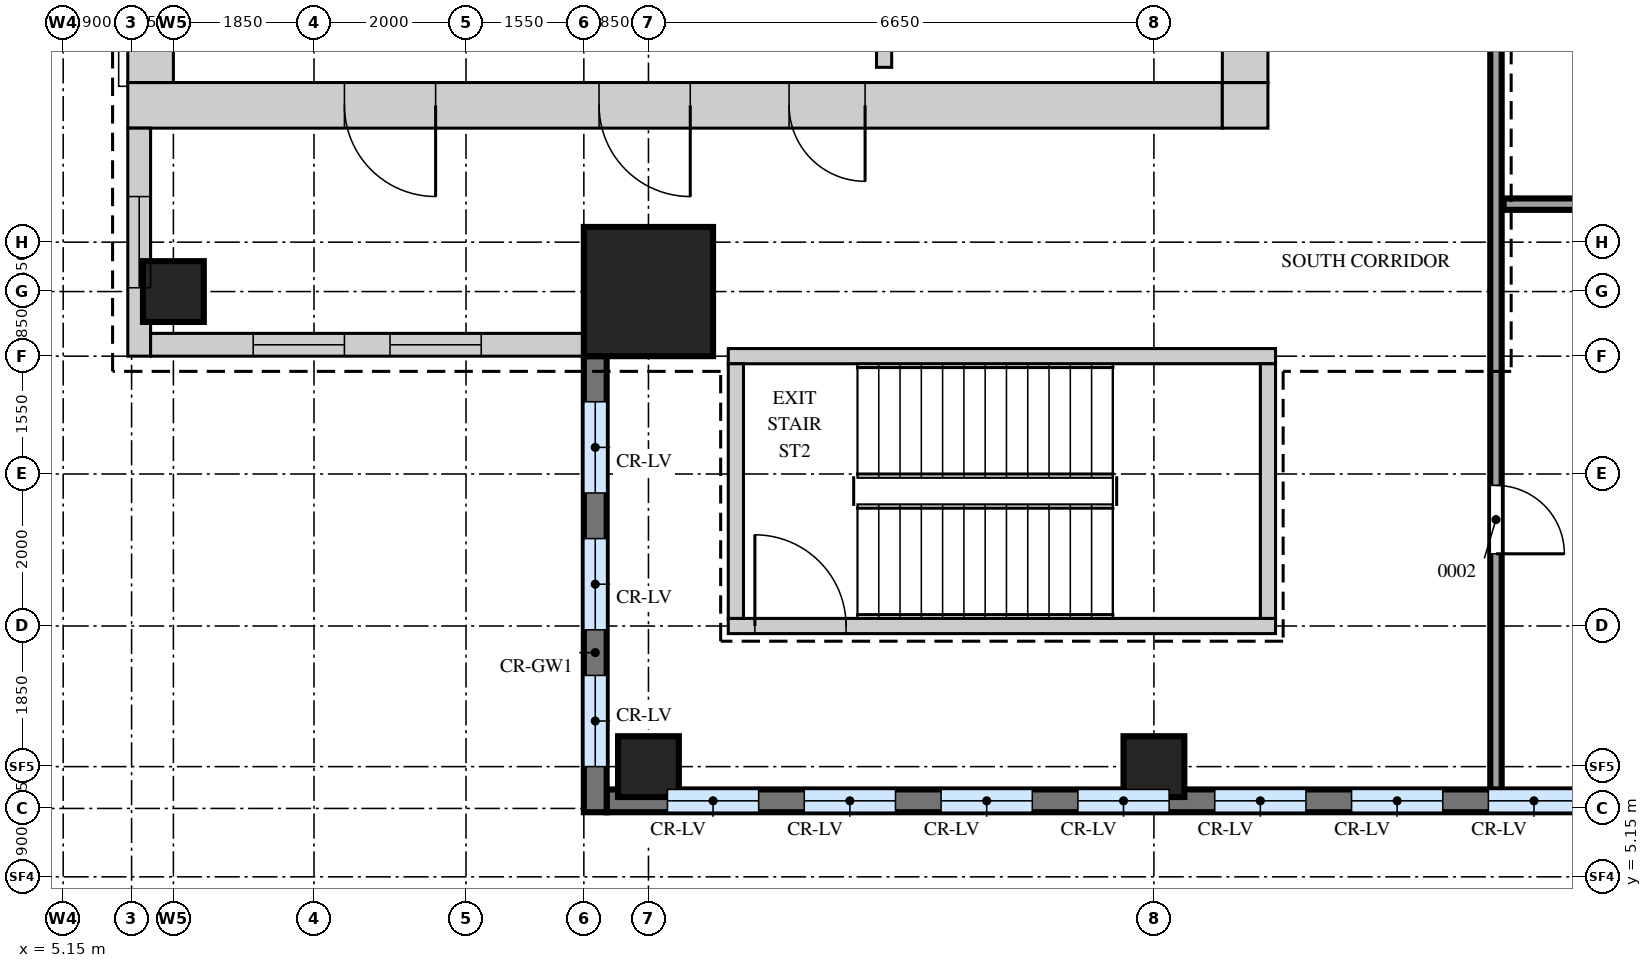
"""IFC4 building model, lengths in metres.
Left out: names, types, materials, properties, quantities, classifications, styles, units other than length and angle.
Written with IfcOpenShell. Run it as: python <this file> out.ifc"""

import sys

from ifc_helpers import new_model, si_unit, direction, frame, frame_2d, origin, origin_2d, place, context, subcontext, project, spatial, rectangle, extrude, source, transform, mapped, element, fill, save


model = new_model("IFC4")
c1 = context("Model", 3, precision=1e-05, world=origin(), true_north=direction((0.0, 1.0)))
c2 = subcontext(c1, "Body", "Model", "MODEL_VIEW")
j1 = project(units=[si_unit("LENGTHUNIT", "METRE"), si_unit("PLANEANGLEUNIT", "RADIAN")], contexts=[c1])
p1 = place(None, origin())
s1 = spatial("IfcSite", under=j1, at=p1, CompositionType="ELEMENT")
p2 = place(p1, origin())
s2 = spatial("IfcBuilding", under=s1, at=p2, CompositionType="ELEMENT")
p3 = place(p2, frame((0.0, 0.0, 334.7)))
s3 = spatial("IfcBuildingStorey", under=s2, at=p3, CompositionType="ELEMENT", Elevation=334.7)
m1 = source(origin(), c2, "Body", "SweptSolid", [
    extrude(rectangle(XDim=14.4, YDim=0.6, at=frame_2d((7.2, 0.0))), origin(), (0.0, 0.0, 1.0), 4.25),
])
p4 = place(p3, frame((6.0, 15.3, 0.0), z_axis=(0.0, 0.0, 1.0), x_axis=(1.0, 0.0, 0.0)))
e1 = element("IfcWall", 1, at=p4, inside=s3, PredefinedType="SHEAR", context=c2, shape_type="MappedRepresentation", body=[
    mapped(m1, transform((0.0, 0.0, 0.0))),
])
m2 = source(origin(), c2, "Body", "SweptSolid", [
    extrude(rectangle(XDim=1.2, YDim=2.1, at=frame_2d((0.6, 1.05))), frame((0.0, 0.31, 0.0), z_axis=(0.0, -1.0, 0.0), x_axis=(1.0, 0.0, 0.0)), (0.0, 0.0, 1.0), 0.62),
])
p5 = place(p4, frame((6.2, 0.0, 0.0)))
e2 = element("IfcOpeningElement", 2, at=p5, cuts=e1, PredefinedType="OPENING", context=c2, shape_type="MappedRepresentation", body=[
    mapped(m2, transform((0.0, 0.0, 0.0))),
])
p6 = place(p4, frame((2.85, 0.0, 0.0)))
e3 = element("IfcOpeningElement", 3, at=p6, cuts=e1, PredefinedType="OPENING", context=c2, shape_type="MappedRepresentation", body=[
    mapped(m2, transform((0.0, 0.0, 0.0))),
])
m3 = source(origin(), c2, "Body", "SweptSolid", [
    extrude(rectangle(XDim=1.0, YDim=2.1, at=frame_2d((0.5, 1.05))), frame((0.0, 0.31, 0.0), z_axis=(0.0, -1.0, 0.0), x_axis=(1.0, 0.0, 0.0)), (0.0, 0.0, 1.0), 0.62),
])
p7 = place(p4, frame((8.7, 0.0, 0.0)))
e4 = element("IfcOpeningElement", 4, at=p7, cuts=e1, PredefinedType="OPENING", context=c2, shape_type="MappedRepresentation", body=[
    mapped(m3, transform((0.0, 0.0, 0.0))),
])
m4 = source(origin(), c2, "Body", "SweptSolid", [
    extrude(rectangle(XDim=0.6, YDim=0.6, at=frame_2d((0.3, 0.0))), origin(), (0.0, 0.0, 1.0), 4.25),
])
p8 = place(p3, frame((20.4, 15.3, 0.0), z_axis=(0.0, 0.0, 1.0), x_axis=(1.0, 0.0, 0.0)))
e5 = element("IfcWall", 5, at=p8, inside=s3, PredefinedType="SHEAR", context=c2, shape_type="MappedRepresentation", body=[
    mapped(m4, transform((0.0, 0.0, 0.0))),
])
m5 = source(origin(), c2, "Body", "SweptSolid", [
    extrude(rectangle(XDim=22.8, YDim=0.6, at=frame_2d((11.4, 0.0))), origin(), (0.0, 0.0, 1.0), 4.25),
])
p9 = place(p3, frame((20.7, 15.6, 0.0), z_axis=(0.0, 0.0, 1.0), x_axis=(0.0, 1.0, 0.0)))
e6 = element("IfcWall", 6, at=p9, inside=s3, PredefinedType="SHEAR", context=c2, shape_type="MappedRepresentation", body=[
    mapped(m5, transform((0.0, 0.0, 0.0))),
])
m6 = source(origin(), c2, "Body", "SweptSolid", [
    extrude(rectangle(XDim=0.9, YDim=2.1, at=frame_2d((0.45, 1.05))), frame((0.0, 0.31, 0.0), z_axis=(0.0, -1.0, 0.0), x_axis=(1.0, 0.0, 0.0)), (0.0, 0.0, 1.0), 0.62),
])
p10 = place(p9, frame((8.2, 0.0, 0.0)))
e7 = element("IfcOpeningElement", 7, at=p10, cuts=e6, PredefinedType="OPENING", context=c2, shape_type="MappedRepresentation", body=[
    mapped(m6, transform((0.0, 0.0, 0.0))),
])
p11 = place(p9, frame((11.35, 0.0, 0.0)))
e8 = element("IfcOpeningElement", 8, at=p11, cuts=e6, PredefinedType="OPENING", context=c2, shape_type="MappedRepresentation", body=[
    mapped(m6, transform((0.0, 0.0, 0.0))),
])
p12 = place(p9, frame((14.65, 0.0, 0.0)))
e9 = element("IfcOpeningElement", 9, at=p12, cuts=e6, PredefinedType="OPENING", context=c2, shape_type="MappedRepresentation", body=[
    mapped(m6, transform((0.0, 0.0, 0.0))),
])
p13 = place(p9, frame((1.55, 0.0, 0.0)))
e10 = element("IfcOpeningElement", 10, at=p13, cuts=e6, PredefinedType="OPENING", context=c2, shape_type="MappedRepresentation", body=[
    mapped(m6, transform((0.0, 0.0, 0.0))),
])
p14 = place(p9, frame((5.1, 0.0, 0.0)))
e11 = element("IfcOpeningElement", 11, at=p14, cuts=e6, PredefinedType="OPENING", context=c2, shape_type="MappedRepresentation", body=[
    mapped(m6, transform((0.0, 0.0, 0.0))),
])
p15 = place(p3, frame((6.3, 15.6, 0.0), z_axis=(0.0, 0.0, 1.0), x_axis=(0.0, 1.0, 0.0)))
e12 = element("IfcWall", 12, at=p15, inside=s3, PredefinedType="SHEAR", context=c2, shape_type="MappedRepresentation", body=[
    mapped(m5, transform((0.0, 0.0, 0.0))),
])
m7 = source(origin(), c2, "Body", "SweptSolid", [
    extrude(rectangle(XDim=7.2, YDim=0.2, at=frame_2d((3.6, 0.0))), origin(), (0.0, 0.0, 1.0), 4.25),
])
p16 = place(p3, frame((13.9, 12.0, 0.0), z_axis=(0.0, 0.0, 1.0), x_axis=(1.0, 0.0, 0.0)))
e13 = element("IfcWall", 13, at=p16, inside=s3, PredefinedType="SHEAR", context=c2, shape_type="MappedRepresentation", body=[
    mapped(m7, transform((0.0, 0.0, 0.0))),
])
p17 = place(p3, frame((13.9, 8.45, 0.0), z_axis=(0.0, 0.0, 1.0), x_axis=(1.0, 0.0, 0.0)))
e14 = element("IfcWall", 14, at=p17, inside=s3, PredefinedType="SHEAR", context=c2, shape_type="MappedRepresentation", body=[
    mapped(m7, transform((0.0, 0.0, 0.0))),
])
m8 = source(origin(), c2, "Body", "SweptSolid", [
    extrude(rectangle(XDim=1.2, YDim=2.1, at=frame_2d((0.6, 1.05))), frame((0.0, 0.11, 0.0), z_axis=(0.0, -1.0, 0.0), x_axis=(1.0, 0.0, 0.0)), (0.0, 0.0, 1.0), 0.22),
])
p18 = place(p17, frame((0.35, 0.0, 0.0)))
e15 = element("IfcOpeningElement", 15, at=p18, cuts=e14, PredefinedType="OPENING", context=c2, shape_type="MappedRepresentation", body=[
    mapped(m8, transform((0.0, 0.0, 0.0))),
])
m9 = source(origin(), c2, "Body", "SweptSolid", [
    extrude(rectangle(XDim=3.35, YDim=0.2, at=frame_2d((1.675, 0.0))), origin(), (0.0, 0.0, 1.0), 4.25),
])
for number, where, z_axis, x_axis in (
    (16, (21.0, 8.55, 0.0), (0.0, 0.0, 1.0), (0.0, 1.0, 0.0)),
    (17, (14.0, 8.55, 0.0), (0.0, 0.0, 1.0), (0.0, 1.0, 0.0)),
):
    element("IfcWall", number, at=place(p3, frame(where, z_axis=z_axis, x_axis=x_axis)), inside=s3, PredefinedType="SHEAR", context=c2, shape_type="MappedRepresentation", body=[
        mapped(m9, transform((0.0, 0.0, 0.0))),
    ])
m10 = source(origin(), c2, "Body", "SweptSolid", [
    extrude(rectangle(XDim=1.7, YDim=1.7, at=origin_2d()), origin(), (0.0, 0.0, 1.0), 4.5),
])
p19 = place(p3, frame((12.85, 12.85, 0.0), z_axis=(0.0, 0.0, 1.0), x_axis=(1.0, 0.0, 0.0)))
e18 = element("IfcColumn", 18, at=p19, inside=s3, PredefinedType="COLUMN", context=c2, shape_type="MappedRepresentation", body=[
    mapped(m10, transform((0.0, 0.0, 0.0))),
])
m11 = source(origin(), c2, "Body", "SweptSolid", [
    extrude(rectangle(XDim=0.8, YDim=0.8, at=origin_2d()), origin(), (0.0, 0.0, 1.0), 4.5),
])
for number, where, z_axis, x_axis in (
    (19, (12.85, 6.6, 0.0), (0.0, 0.0, 1.0), (1.0, 0.0, 0.0)),
    (20, (19.5, 6.6, 0.0), (0.0, 0.0, 1.0), (1.0, 0.0, 0.0)),
    (21, (6.6, 12.85, 0.0), (0.0, 0.0, 1.0), (1.0, 0.0, 0.0)),
):
    element("IfcColumn", number, at=place(p3, frame(where, z_axis=z_axis, x_axis=x_axis)), inside=s3, PredefinedType="COLUMN", context=c2, shape_type="MappedRepresentation", body=[
        mapped(m11, transform((0.0, 0.0, 0.0))),
    ])
m12 = source(origin(), c2, "Body", "SweptSolid", [
    extrude(rectangle(XDim=20.805, YDim=0.3, at=frame_2d((10.403, 0.0))), origin(), (0.0, 0.0, 1.0), 4.5),
])
p20 = place(p3, frame((12.3, 6.15, 0.0), z_axis=(0.0, 0.0, 1.0), x_axis=(1.0, 0.0, 0.0)))
e22 = element("IfcWall", 22, at=p20, inside=s3, PredefinedType="SOLIDWALL", context=c2, shape_type="MappedRepresentation", body=[
    mapped(m12, transform((0.0, 0.0, 0.0))),
])
m13 = source(origin(), c2, "Body", "SweptSolid", [
    extrude(rectangle(XDim=1.2, YDim=2.4, at=frame_2d((0.6, 1.2))), frame((0.0, 0.16, 0.0), z_axis=(0.0, -1.0, 0.0), x_axis=(1.0, 0.0, 0.0)), (0.0, 0.0, 1.0), 0.32),
])
p21 = place(p20, frame((0.8, 0.0, 0.9)))
e23 = element("IfcOpeningElement", 23, at=p21, cuts=e22, PredefinedType="OPENING", context=c2, shape_type="MappedRepresentation", body=[
    mapped(m13, transform((0.0, 0.0, 0.0))),
])
p22 = place(p20, frame((2.6, 0.0, 0.9)))
e24 = element("IfcOpeningElement", 24, at=p22, cuts=e22, PredefinedType="OPENING", context=c2, shape_type="MappedRepresentation", body=[
    mapped(m13, transform((0.0, 0.0, 0.0))),
])
p23 = place(p20, frame((4.4, 0.0, 0.9)))
e25 = element("IfcOpeningElement", 25, at=p23, cuts=e22, PredefinedType="OPENING", context=c2, shape_type="MappedRepresentation", body=[
    mapped(m13, transform((0.0, 0.0, 0.0))),
])
p24 = place(p20, frame((6.2, 0.0, 0.9)))
e26 = element("IfcOpeningElement", 26, at=p24, cuts=e22, PredefinedType="OPENING", context=c2, shape_type="MappedRepresentation", body=[
    mapped(m13, transform((0.0, 0.0, 0.0))),
])
p25 = place(p20, frame((8.0, 0.0, 0.9)))
e27 = element("IfcOpeningElement", 27, at=p25, cuts=e22, PredefinedType="OPENING", context=c2, shape_type="MappedRepresentation", body=[
    mapped(m13, transform((0.0, 0.0, 0.0))),
])
p26 = place(p20, frame((9.8, 0.0, 0.9)))
e28 = element("IfcOpeningElement", 28, at=p26, cuts=e22, PredefinedType="OPENING", context=c2, shape_type="MappedRepresentation", body=[
    mapped(m13, transform((0.0, 0.0, 0.0))),
])
p27 = place(p20, frame((11.6, 0.0, 0.9)))
e29 = element("IfcOpeningElement", 29, at=p27, cuts=e22, PredefinedType="OPENING", context=c2, shape_type="MappedRepresentation", body=[
    mapped(m13, transform((0.0, 0.0, 0.0))),
])
p28 = place(p20, frame((13.4, 0.0, 0.9)))
e30 = element("IfcOpeningElement", 30, at=p28, cuts=e22, PredefinedType="OPENING", context=c2, shape_type="MappedRepresentation", body=[
    mapped(m13, transform((0.0, 0.0, 0.0))),
])
p29 = place(p20, frame((15.2, 0.0, 0.9)))
e31 = element("IfcOpeningElement", 31, at=p29, cuts=e22, PredefinedType="OPENING", context=c2, shape_type="MappedRepresentation", body=[
    mapped(m13, transform((0.0, 0.0, 0.0))),
])
p30 = place(p20, frame((17.0, 0.0, 0.9)))
e32 = element("IfcOpeningElement", 32, at=p30, cuts=e22, PredefinedType="OPENING", context=c2, shape_type="MappedRepresentation", body=[
    mapped(m13, transform((0.0, 0.0, 0.0))),
])
p31 = place(p20, frame((18.8, 0.0, 0.9)))
e33 = element("IfcOpeningElement", 33, at=p31, cuts=e22, PredefinedType="OPENING", context=c2, shape_type="MappedRepresentation", body=[
    mapped(m13, transform((0.0, 0.0, 0.0))),
])
m14 = source(origin(), c2, "Body", "SweptSolid", [
    extrude(rectangle(XDim=3.0, YDim=0.3, at=frame_2d((1.5, 0.0))), origin(), (0.0, 0.0, 1.0), 4.5),
])
p32 = place(p3, frame((6.15, 15.0, 0.0), z_axis=(0.0, 0.0, 1.0), x_axis=(0.0, -1.0, 0.0)))
e34 = element("IfcWall", 34, at=p32, inside=s3, PredefinedType="SOLIDWALL", context=c2, shape_type="MappedRepresentation", body=[
    mapped(m14, transform((0.0, 0.0, 0.0))),
])
p33 = place(p32, frame((0.9, 0.0, 0.9)))
e35 = element("IfcOpeningElement", 35, at=p33, cuts=e34, PredefinedType="OPENING", context=c2, shape_type="MappedRepresentation", body=[
    mapped(m13, transform((0.0, 0.0, 0.0))),
])
m15 = source(origin(), c2, "Body", "SweptSolid", [
    extrude(rectangle(XDim=5.7, YDim=0.3, at=frame_2d((2.85, 0.0))), origin(), (0.0, 0.0, 1.0), 4.5),
])
p34 = place(p3, frame((6.3, 12.15, 0.0), z_axis=(0.0, 0.0, 1.0), x_axis=(1.0, 0.0, 0.0)))
e36 = element("IfcWall", 36, at=p34, inside=s3, PredefinedType="SOLIDWALL", context=c2, shape_type="MappedRepresentation", body=[
    mapped(m15, transform((0.0, 0.0, 0.0))),
])
p35 = place(p34, frame((1.35, 0.0, 0.9)))
e37 = element("IfcOpeningElement", 37, at=p35, cuts=e36, PredefinedType="OPENING", context=c2, shape_type="MappedRepresentation", body=[
    mapped(m13, transform((0.0, 0.0, 0.0))),
])
p36 = place(p34, frame((3.15, 0.0, 0.9)))
e38 = element("IfcOpeningElement", 38, at=p36, cuts=e36, PredefinedType="OPENING", context=c2, shape_type="MappedRepresentation", body=[
    mapped(m13, transform((0.0, 0.0, 0.0))),
])
m16 = source(origin(), c2, "Body", "SweptSolid", [
    extrude(rectangle(XDim=6.0, YDim=0.3, at=frame_2d((3.0, 0.0))), origin(), (0.0, 0.0, 1.0), 4.5),
])
p37 = place(p3, frame((12.15, 12.0, 0.0), z_axis=(0.0, 0.0, 1.0), x_axis=(0.0, -1.0, 0.0)))
e39 = element("IfcWall", 39, at=p37, inside=s3, PredefinedType="SOLIDWALL", context=c2, shape_type="MappedRepresentation", body=[
    mapped(m16, transform((0.0, 0.0, 0.0))),
])
p38 = place(p37, frame((0.6, 0.0, 0.9)))
e40 = element("IfcOpeningElement", 40, at=p38, cuts=e39, PredefinedType="OPENING", context=c2, shape_type="MappedRepresentation", body=[
    mapped(m13, transform((0.0, 0.0, 0.0))),
])
p39 = place(p37, frame((2.4, 0.0, 0.9)))
e41 = element("IfcOpeningElement", 41, at=p39, cuts=e39, PredefinedType="OPENING", context=c2, shape_type="MappedRepresentation", body=[
    mapped(m13, transform((0.0, 0.0, 0.0))),
])
p40 = place(p37, frame((4.2, 0.0, 0.9)))
e42 = element("IfcOpeningElement", 42, at=p40, cuts=e39, PredefinedType="OPENING", context=c2, shape_type="MappedRepresentation", body=[
    mapped(m13, transform((0.0, 0.0, 0.0))),
])
m17 = source(origin(), c2, "Body", "SweptSolid", [
    extrude(rectangle(XDim=32.6, YDim=0.15, at=frame_2d((16.3, 0.0))), origin(), (0.0, 0.0, 1.0), 4.3),
])
p41 = place(p3, frame((24.0, 6.3, 0.0), z_axis=(0.0, 0.0, 1.0), x_axis=(0.0, 1.0, 0.0)))
e43 = element("IfcWall", 43, at=p41, inside=s3, PredefinedType="PARTITIONING", context=c2, shape_type="MappedRepresentation", body=[
    mapped(m17, transform((0.0, 0.0, 0.0))),
])
m18 = source(origin(), c2, "Body", "SweptSolid", [
    extrude(rectangle(XDim=0.9, YDim=2.1, at=frame_2d((0.45, 1.05))), frame((0.0, 0.085, 0.0), z_axis=(0.0, -1.0, 0.0), x_axis=(1.0, 0.0, 0.0)), (0.0, 0.0, 1.0), 0.17),
])
p42 = place(p41, frame((3.1, 0.0, 0.0)))
e44 = element("IfcOpeningElement", 44, at=p42, cuts=e43, PredefinedType="OPENING", context=c2, shape_type="MappedRepresentation", body=[
    mapped(m18, transform((0.0, 0.0, 0.0))),
])
p43 = place(p41, frame((12.6, 0.0, 0.0)))
e45 = element("IfcOpeningElement", 45, at=p43, cuts=e43, PredefinedType="OPENING", context=c2, shape_type="MappedRepresentation", body=[
    mapped(m18, transform((0.0, 0.0, 0.0))),
])
p44 = place(p41, frame((21.9, 0.0, 0.0)))
e46 = element("IfcOpeningElement", 46, at=p44, cuts=e43, PredefinedType="OPENING", context=c2, shape_type="MappedRepresentation", body=[
    mapped(m18, transform((0.0, 0.0, 0.0))),
])
m19 = source(origin(), c2, "Body", "SweptSolid", [
    extrude(rectangle(XDim=11.0, YDim=0.15, at=frame_2d((5.5, 0.0))), origin(), (0.0, 0.0, 1.0), 4.3),
])
p45 = place(p3, frame((24.1, 14.0, 0.0), z_axis=(0.0, 0.0, 1.0), x_axis=(1.0, 0.0, 0.0)))
e47 = element("IfcWall", 47, at=p45, inside=s3, PredefinedType="PARTITIONING", context=c2, shape_type="MappedRepresentation", body=[
    mapped(m19, transform((0.0, 0.0, 0.0))),
])
m20 = source(origin(), c2, "Body", "SweptSolid", [
    extrude(rectangle(XDim=3.4, YDim=0.2, at=frame_2d((1.7, 0.0))), origin(), (0.0, 0.0, 1.0), 4.3),
])
p46 = place(p3, frame((15.95, 15.8, 0.0), z_axis=(0.0, 0.0, 1.0), x_axis=(0.0, 1.0, 0.0)))
e48 = element("IfcWall", 48, at=p46, inside=s3, PredefinedType="PARTITIONING", context=c2, shape_type="MappedRepresentation", body=[
    mapped(m20, transform((0.0, 0.0, 0.0))),
])
m21 = source(origin(), c2, "Body", "SweptSolid", [
    extrude(rectangle(XDim=1.2, YDim=2.4, at=frame_2d((0.6, 1.2))), frame((0.0, 0.03, 0.0), z_axis=(0.0, -1.0, 0.0), x_axis=(1.0, 0.0, 0.0)), (0.0, 0.0, 1.0), 0.06),
])
p47 = place(p21, origin())
e49 = element("IfcWindow", 49, at=p47, inside=s3, PartitioningType="SINGLE_PANEL", PredefinedType="WINDOW", context=c2, shape_type="MappedRepresentation", body=[
    mapped(m21, transform((0.0, 0.0, 0.0))),
])
fill(e23, e49)
p48 = place(p22, origin())
e50 = element("IfcWindow", 50, at=p48, inside=s3, PartitioningType="SINGLE_PANEL", PredefinedType="WINDOW", context=c2, shape_type="MappedRepresentation", body=[
    mapped(m21, transform((0.0, 0.0, 0.0))),
])
fill(e24, e50)
p49 = place(p23, origin())
e51 = element("IfcWindow", 51, at=p49, inside=s3, PartitioningType="SINGLE_PANEL", PredefinedType="WINDOW", context=c2, shape_type="MappedRepresentation", body=[
    mapped(m21, transform((0.0, 0.0, 0.0))),
])
fill(e25, e51)
p50 = place(p24, origin())
e52 = element("IfcWindow", 52, at=p50, inside=s3, PartitioningType="SINGLE_PANEL", PredefinedType="WINDOW", context=c2, shape_type="MappedRepresentation", body=[
    mapped(m21, transform((0.0, 0.0, 0.0))),
])
fill(e26, e52)
p51 = place(p25, origin())
e53 = element("IfcWindow", 53, at=p51, inside=s3, PartitioningType="SINGLE_PANEL", PredefinedType="WINDOW", context=c2, shape_type="MappedRepresentation", body=[
    mapped(m21, transform((0.0, 0.0, 0.0))),
])
fill(e27, e53)
p52 = place(p26, origin())
e54 = element("IfcWindow", 54, at=p52, inside=s3, PartitioningType="SINGLE_PANEL", PredefinedType="WINDOW", context=c2, shape_type="MappedRepresentation", body=[
    mapped(m21, transform((0.0, 0.0, 0.0))),
])
fill(e28, e54)
p53 = place(p27, origin())
e55 = element("IfcWindow", 55, at=p53, inside=s3, PartitioningType="SINGLE_PANEL", PredefinedType="WINDOW", context=c2, shape_type="MappedRepresentation", body=[
    mapped(m21, transform((0.0, 0.0, 0.0))),
])
fill(e29, e55)
p54 = place(p33, origin())
e56 = element("IfcWindow", 56, at=p54, inside=s3, PartitioningType="SINGLE_PANEL", PredefinedType="WINDOW", context=c2, shape_type="MappedRepresentation", body=[
    mapped(m21, transform((0.0, 0.0, 0.0))),
])
fill(e35, e56)
p55 = place(p35, origin())
e57 = element("IfcWindow", 57, at=p55, inside=s3, PartitioningType="SINGLE_PANEL", PredefinedType="WINDOW", context=c2, shape_type="MappedRepresentation", body=[
    mapped(m21, transform((0.0, 0.0, 0.0))),
])
fill(e37, e57)
p56 = place(p36, origin())
e58 = element("IfcWindow", 58, at=p56, inside=s3, PartitioningType="SINGLE_PANEL", PredefinedType="WINDOW", context=c2, shape_type="MappedRepresentation", body=[
    mapped(m21, transform((0.0, 0.0, 0.0))),
])
fill(e38, e58)
p57 = place(p38, origin())
e59 = element("IfcWindow", 59, at=p57, inside=s3, PartitioningType="SINGLE_PANEL", PredefinedType="WINDOW", context=c2, shape_type="MappedRepresentation", body=[
    mapped(m21, transform((0.0, 0.0, 0.0))),
])
fill(e40, e59)
p58 = place(p39, origin())
e60 = element("IfcWindow", 60, at=p58, inside=s3, PartitioningType="SINGLE_PANEL", PredefinedType="WINDOW", context=c2, shape_type="MappedRepresentation", body=[
    mapped(m21, transform((0.0, 0.0, 0.0))),
])
fill(e41, e60)
p59 = place(p40, origin())
e61 = element("IfcWindow", 61, at=p59, inside=s3, PartitioningType="SINGLE_PANEL", PredefinedType="WINDOW", context=c2, shape_type="MappedRepresentation", body=[
    mapped(m21, transform((0.0, 0.0, 0.0))),
])
fill(e42, e61)
m22 = source(origin(), c2, "Body", "SweptSolid", [
    extrude(rectangle(XDim=0.9, YDim=2.1, at=frame_2d((0.45, 1.05))), frame((0.0, 0.025, 0.0), z_axis=(0.0, -1.0, 0.0), x_axis=(1.0, 0.0, 0.0)), (0.0, 0.0, 1.0), 0.05),
])
p60 = place(p42, origin())
e62 = element("IfcDoor", 62, at=p60, inside=s3, OperationType="SINGLE_SWING_LEFT", PredefinedType="DOOR", context=c2, shape_type="MappedRepresentation", body=[
    mapped(m22, transform((0.0, 0.0, 0.0))),
])
fill(e44, e62)
m23 = source(origin(), c2, "Body", "SweptSolid", [
    extrude(rectangle(XDim=1.2, YDim=2.1, at=frame_2d((0.6, 1.05))), frame((0.0, 0.25, 0.0), z_axis=(0.0, -1.0, 0.0), x_axis=(1.0, 0.0, 0.0)), (0.0, 0.0, 1.0), 0.5),
])
p61 = place(p5, origin())
e63 = element("IfcDoor", 63, at=p61, inside=s3, OperationType="SINGLE_SWING_RIGHT", PredefinedType="DOOR", context=c2, shape_type="MappedRepresentation", body=[
    mapped(m23, transform((0.0, 0.0, 0.0))),
])
fill(e2, e63)
p62 = place(p6, origin())
e64 = element("IfcDoor", 64, at=p62, inside=s3, OperationType="SINGLE_SWING_RIGHT", PredefinedType="DOOR", context=c2, shape_type="MappedRepresentation", body=[
    mapped(m23, transform((0.0, 0.0, 0.0))),
])
fill(e3, e64)
m24 = source(origin(), c2, "Body", "SweptSolid", [
    extrude(rectangle(XDim=1.0, YDim=2.1, at=frame_2d((0.5, 1.05))), frame((0.0, 0.25, 0.0), z_axis=(0.0, -1.0, 0.0), x_axis=(1.0, 0.0, 0.0)), (0.0, 0.0, 1.0), 0.5),
])
p63 = place(p7, origin())
e65 = element("IfcDoor", 65, at=p63, inside=s3, OperationType="SINGLE_SWING_RIGHT", PredefinedType="DOOR", context=c2, shape_type="MappedRepresentation", body=[
    mapped(m24, transform((0.0, 0.0, 0.0))),
])
fill(e4, e65)
m25 = source(origin(), c2, "Body", "SweptSolid", [
    extrude(rectangle(XDim=1.2, YDim=2.1, at=frame_2d((0.6, 1.05))), frame((0.0, 0.025, 0.0), z_axis=(0.0, -1.0, 0.0), x_axis=(1.0, 0.0, 0.0)), (0.0, 0.0, 1.0), 0.05),
])
p64 = place(p18, origin())
e66 = element("IfcDoor", 66, at=p64, inside=s3, OperationType="SINGLE_SWING_RIGHT", PredefinedType="DOOR", context=c2, shape_type="MappedRepresentation", body=[
    mapped(m25, transform((0.0, 0.0, 0.0))),
])
fill(e15, e66)
save(model, sys.argv[1])
